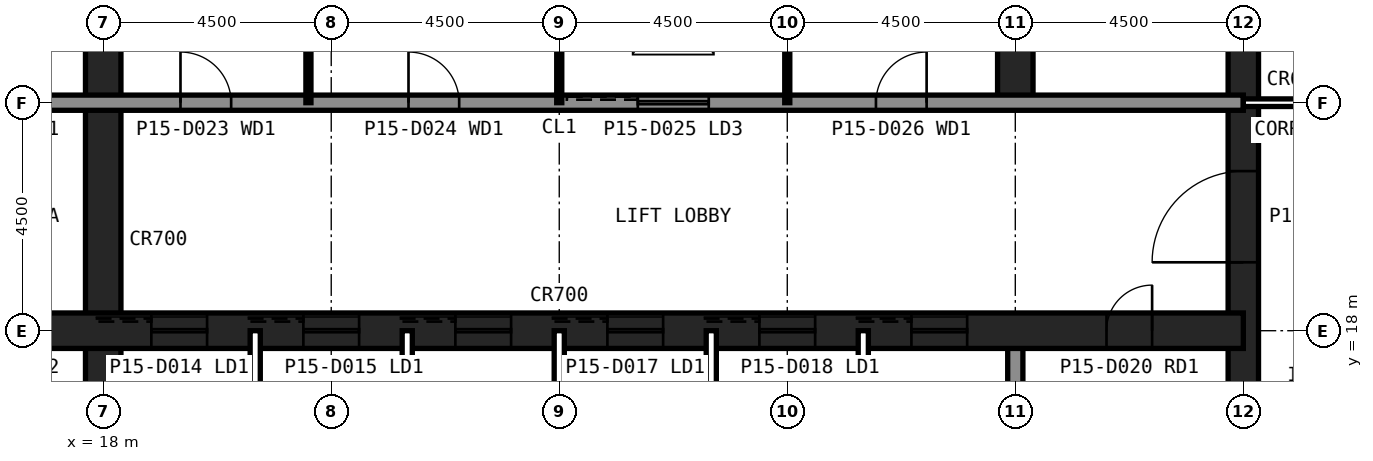
"""IFC4 building model, lengths in metres.
Left out: names, types, materials, properties, quantities, classifications, styles, units other than length and angle.
Written with IfcOpenShell. Run it as: python <this file> out.ifc"""

import sys

from ifc_helpers import new_model, si_unit, direction, frame, frame_2d, origin, place, context, subcontext, project, spatial, rectangle, extrude, element, fill, save


model = new_model("IFC4")
c1 = context("Model", 3, precision=1e-05, world=origin(), true_north=direction((0.0, 1.0)))
c2 = subcontext(c1, "Body", "Model", "MODEL_VIEW")
j1 = project(units=[si_unit("LENGTHUNIT", "METRE"), si_unit("PLANEANGLEUNIT", "RADIAN")], contexts=[c1])
p1 = place(None, origin())
s1 = spatial("IfcSite", under=j1, at=p1, CompositionType="ELEMENT")
p2 = place(p1, origin())
s2 = spatial("IfcBuilding", under=s1, at=p2, CompositionType="ELEMENT")
p3 = place(p2, frame((0.0, 0.0, 62.6)))
s3 = spatial("IfcBuildingStorey", under=s2, at=p3, CompositionType="ELEMENT", Elevation=62.6)
p4 = place(p3, frame((40.5, 13.5, 0.0), z_axis=(0.0, 0.0, 1.0), x_axis=(0.0, 1.0, 0.0)))
e1 = element("IfcWall", 1, at=p4, inside=s3, PredefinedType="SHEAR", context=c2, shape_type="SweptSolid", body=[
    extrude(rectangle(XDim=27.0, YDim=0.6, at=frame_2d((13.5, 0.0))), origin(), (0.0, 0.0, 1.0), 4.2),
])
p5 = place(p4, frame((5.85, 0.0, 0.0)))
e2 = element("IfcOpeningElement", 2, at=p5, cuts=e1, PredefinedType="OPENING", context=c2, shape_type="SweptSolid", body=[
    extrude(rectangle(XDim=1.8, YDim=2.1, at=frame_2d((0.9, 1.05))), frame((0.0, 0.31, 0.0), z_axis=(0.0, -1.0, 0.0), x_axis=(1.0, 0.0, 0.0)), (0.0, 0.0, 1.0), 0.62),
])
p6 = place(p4, frame((19.65, 0.0, 0.0)))
e3 = element("IfcOpeningElement", 3, at=p6, cuts=e1, PredefinedType="OPENING", context=c2, shape_type="SweptSolid", body=[
    extrude(rectangle(XDim=1.2, YDim=2.1, at=frame_2d((0.6, 1.05))), frame((0.0, 0.31, 0.0), z_axis=(0.0, -1.0, 0.0), x_axis=(1.0, 0.0, 0.0)), (0.0, 0.0, 1.0), 0.62),
])
p7 = place(p3, frame((18.0, 13.5, 0.0), z_axis=(0.0, 0.0, 1.0), x_axis=(0.0, 1.0, 0.0)))
e4 = element("IfcWall", 4, at=p7, inside=s3, PredefinedType="SHEAR", context=c2, shape_type="SweptSolid", body=[
    extrude(rectangle(XDim=18.0, YDim=0.7, at=frame_2d((9.0, 0.0))), origin(), (0.0, 0.0, 1.0), 4.2),
])
p8 = place(p3, frame((36.0, 13.5, 0.0), z_axis=(0.0, 0.0, 1.0), x_axis=(0.0, 1.0, 0.0)))
e5 = element("IfcWall", 5, at=p8, inside=s3, PredefinedType="SOLIDWALL", context=c2, shape_type="SweptSolid", body=[
    extrude(rectangle(XDim=4.5, YDim=0.3, at=frame_2d((2.25, 0.0))), origin(), (0.0, 0.0, 1.0), 4.04),
])
p9 = place(p3, frame((36.0, 22.5, 0.0), z_axis=(0.0, 0.0, 1.0), x_axis=(0.0, 1.0, 0.0)))
e6 = element("IfcWall", 6, at=p9, inside=s3, PredefinedType="SHEAR", context=c2, shape_type="SweptSolid", body=[
    extrude(rectangle(XDim=18.0, YDim=0.7, at=frame_2d((9.0, 0.0))), origin(), (0.0, 0.0, 1.0), 4.2),
])
p10 = place(p3, frame((13.5, 18.0, 0.0), z_axis=(0.0, 0.0, 1.0), x_axis=(1.0, 0.0, 0.0)))
e7 = element("IfcWall", 7, at=p10, inside=s3, PredefinedType="SHEAR", context=c2, shape_type="SweptSolid", body=[
    extrude(rectangle(XDim=27.0, YDim=0.7, at=frame_2d((13.5, 0.0))), origin(), (0.0, 0.0, 1.0), 4.2),
])
p11 = place(p10, frame((24.3, 0.0, 0.0)))
e8 = element("IfcOpeningElement", 8, at=p11, cuts=e7, PredefinedType="OPENING", context=c2, shape_type="SweptSolid", body=[
    extrude(rectangle(XDim=0.9, YDim=2.1, at=frame_2d((0.45, 1.05))), frame((0.0, 0.36, 0.0), z_axis=(0.0, -1.0, 0.0), x_axis=(1.0, 0.0, 0.0)), (0.0, 0.0, 1.0), 0.72),
])
p12 = place(p10, frame((5.45, 0.0, 0.0)))
e9 = element("IfcOpeningElement", 9, at=p12, cuts=e7, PredefinedType="OPENING", context=c2, shape_type="SweptSolid", body=[
    extrude(rectangle(XDim=1.1, YDim=2.1, at=frame_2d((0.55, 1.05))), frame((0.0, 0.36, 0.0), z_axis=(0.0, -1.0, 0.0), x_axis=(1.0, 0.0, 0.0)), (0.0, 0.0, 1.0), 0.72),
])
p13 = place(p10, frame((8.45, 0.0, 0.0)))
e10 = element("IfcOpeningElement", 10, at=p13, cuts=e7, PredefinedType="OPENING", context=c2, shape_type="SweptSolid", body=[
    extrude(rectangle(XDim=1.1, YDim=2.1, at=frame_2d((0.55, 1.05))), frame((0.0, 0.36, 0.0), z_axis=(0.0, -1.0, 0.0), x_axis=(1.0, 0.0, 0.0)), (0.0, 0.0, 1.0), 0.72),
])
p14 = place(p10, frame((11.45, 0.0, 0.0)))
e11 = element("IfcOpeningElement", 11, at=p14, cuts=e7, PredefinedType="OPENING", context=c2, shape_type="SweptSolid", body=[
    extrude(rectangle(XDim=1.1, YDim=2.1, at=frame_2d((0.55, 1.05))), frame((0.0, 0.36, 0.0), z_axis=(0.0, -1.0, 0.0), x_axis=(1.0, 0.0, 0.0)), (0.0, 0.0, 1.0), 0.72),
])
p15 = place(p10, frame((14.45, 0.0, 0.0)))
e12 = element("IfcOpeningElement", 12, at=p15, cuts=e7, PredefinedType="OPENING", context=c2, shape_type="SweptSolid", body=[
    extrude(rectangle(XDim=1.1, YDim=2.1, at=frame_2d((0.55, 1.05))), frame((0.0, 0.36, 0.0), z_axis=(0.0, -1.0, 0.0), x_axis=(1.0, 0.0, 0.0)), (0.0, 0.0, 1.0), 0.72),
])
p16 = place(p10, frame((17.45, 0.0, 0.0)))
e13 = element("IfcOpeningElement", 13, at=p16, cuts=e7, PredefinedType="OPENING", context=c2, shape_type="SweptSolid", body=[
    extrude(rectangle(XDim=1.1, YDim=2.1, at=frame_2d((0.55, 1.05))), frame((0.0, 0.36, 0.0), z_axis=(0.0, -1.0, 0.0), x_axis=(1.0, 0.0, 0.0)), (0.0, 0.0, 1.0), 0.72),
])
p17 = place(p10, frame((20.45, 0.0, 0.0)))
e14 = element("IfcOpeningElement", 14, at=p17, cuts=e7, PredefinedType="OPENING", context=c2, shape_type="SweptSolid", body=[
    extrude(rectangle(XDim=1.1, YDim=2.1, at=frame_2d((0.55, 1.05))), frame((0.0, 0.36, 0.0), z_axis=(0.0, -1.0, 0.0), x_axis=(1.0, 0.0, 0.0)), (0.0, 0.0, 1.0), 0.72),
])
p18 = place(p10, frame((1.6, 0.0, 0.0)))
e15 = element("IfcOpeningElement", 15, at=p18, cuts=e7, PredefinedType="OPENING", context=c2, shape_type="SweptSolid", body=[
    extrude(rectangle(XDim=1.3, YDim=2.2, at=frame_2d((0.65, 1.1))), frame((0.0, 0.36, 0.0), z_axis=(0.0, -1.0, 0.0), x_axis=(1.0, 0.0, 0.0)), (0.0, 0.0, 1.0), 0.72),
])
p19 = place(p3, frame((13.5, 22.5, 0.0), z_axis=(0.0, 0.0, 1.0), x_axis=(1.0, 0.0, 0.0)))
e16 = element("IfcWall", 16, at=p19, inside=s3, PredefinedType="SOLIDWALL", context=c2, shape_type="SweptSolid", body=[
    extrude(rectangle(XDim=27.0, YDim=0.3, at=frame_2d((13.5, 0.0))), origin(), (0.0, 0.0, 1.0), 4.04),
])
p20 = place(p19, frame((1.65, 0.0, 0.0)))
e17 = element("IfcOpeningElement", 17, at=p20, cuts=e16, PredefinedType="OPENING", context=c2, shape_type="SweptSolid", body=[
    extrude(rectangle(XDim=1.2, YDim=2.1, at=frame_2d((0.6, 1.05))), frame((0.0, 0.16, 0.0), z_axis=(0.0, -1.0, 0.0), x_axis=(1.0, 0.0, 0.0)), (0.0, 0.0, 1.0), 0.32),
])
p21 = place(p19, frame((6.025, 0.0, 0.0)))
e18 = element("IfcOpeningElement", 18, at=p21, cuts=e16, PredefinedType="OPENING", context=c2, shape_type="SweptSolid", body=[
    extrude(rectangle(XDim=1.0, YDim=2.1, at=frame_2d((0.5, 1.05))), frame((0.0, 0.16, 0.0), z_axis=(0.0, -1.0, 0.0), x_axis=(1.0, 0.0, 0.0)), (0.0, 0.0, 1.0), 0.32),
])
p22 = place(p19, frame((10.525, 0.0, 0.0)))
e19 = element("IfcOpeningElement", 19, at=p22, cuts=e16, PredefinedType="OPENING", context=c2, shape_type="SweptSolid", body=[
    extrude(rectangle(XDim=1.0, YDim=2.1, at=frame_2d((0.5, 1.05))), frame((0.0, 0.16, 0.0), z_axis=(0.0, -1.0, 0.0), x_axis=(1.0, 0.0, 0.0)), (0.0, 0.0, 1.0), 0.32),
])
p23 = place(p19, frame((19.75, 0.0, 0.0)))
e20 = element("IfcOpeningElement", 20, at=p23, cuts=e16, PredefinedType="OPENING", context=c2, shape_type="SweptSolid", body=[
    extrude(rectangle(XDim=1.0, YDim=2.1, at=frame_2d((0.5, 1.05))), frame((0.0, 0.16, 0.0), z_axis=(0.0, -1.0, 0.0), x_axis=(1.0, 0.0, 0.0)), (0.0, 0.0, 1.0), 0.32),
])
p24 = place(p19, frame((15.05, 0.0, 0.0)))
e21 = element("IfcOpeningElement", 21, at=p24, cuts=e16, PredefinedType="OPENING", context=c2, shape_type="SweptSolid", body=[
    extrude(rectangle(XDim=1.4, YDim=2.4, at=frame_2d((0.7, 1.2))), frame((0.0, 0.16, 0.0), z_axis=(0.0, -1.0, 0.0), x_axis=(1.0, 0.0, 0.0)), (0.0, 0.0, 1.0), 0.32),
])
for number, where, z_axis, x_axis in (
    (22, (21.0, 13.5, 0.0), (0.0, 0.0, 1.0), (0.0, 1.0, 0.0)),
    (23, (24.0, 13.5, 0.0), (0.0, 0.0, 1.0), (0.0, 1.0, 0.0)),
    (24, (27.0, 13.5, 0.0), (0.0, 0.0, 1.0), (0.0, 1.0, 0.0)),
    (25, (30.0, 13.5, 0.0), (0.0, 0.0, 1.0), (0.0, 1.0, 0.0)),
    (26, (33.0, 13.5, 0.0), (0.0, 0.0, 1.0), (0.0, 1.0, 0.0)),
):
    element("IfcWall", number, at=place(p3, frame(where, z_axis=z_axis, x_axis=x_axis)), inside=s3, PredefinedType="PARTITIONING", context=c2, shape_type="SweptSolid", body=[
        extrude(rectangle(XDim=4.5, YDim=0.2, at=frame_2d((2.25, 0.0))), origin(), (0.0, 0.0, 1.0), 4.04),
    ])
for number, where, z_axis, x_axis in (
    (27, (22.05, 22.5, 0.0), (0.0, 0.0, 1.0), (0.0, 1.0, 0.0)),
    (28, (27.0, 22.5, 0.0), (0.0, 0.0, 1.0), (0.0, 1.0, 0.0)),
    (29, (31.5, 22.5, 0.0), (0.0, 0.0, 1.0), (0.0, 1.0, 0.0)),
):
    element("IfcWall", number, at=place(p3, frame(where, z_axis=z_axis, x_axis=x_axis)), inside=s3, PredefinedType="PLUMBINGWALL", context=c2, shape_type="SweptSolid", body=[
        extrude(rectangle(XDim=9.0, YDim=0.1, at=frame_2d((4.5, 0.0))), origin(), (0.0, 0.0, 1.0), 4.04),
    ])
p25 = place(p3, frame((40.5, 22.5, 0.0), z_axis=(0.0, 0.0, 1.0), x_axis=(1.0, 0.0, 0.0)))
e30 = element("IfcWall", 30, at=p25, inside=s3, PredefinedType="PARTITIONING", context=c2, shape_type="SweptSolid", body=[
    extrude(rectangle(XDim=3.0, YDim=0.15, at=frame_2d((1.5, 0.0))), origin(), (0.0, 0.0, 1.0), 3.189),
])
p26 = place(p5, origin())
e31 = element("IfcDoor", 31, at=p26, inside=s3, OperationType="SINGLE_SWING_LEFT", PredefinedType="DOOR", context=c2, shape_type="SweptSolid", body=[
    extrude(rectangle(XDim=1.8, YDim=2.1, at=frame_2d((0.9, 1.05))), frame((0.0, 0.025, 0.0), z_axis=(0.0, -1.0, 0.0), x_axis=(1.0, 0.0, 0.0)), (0.0, 0.0, 1.0), 0.05),
])
fill(e2, e31)
p27 = place(p21, origin())
e32 = element("IfcDoor", 32, at=p27, inside=s3, OperationType="SINGLE_SWING_LEFT", PredefinedType="DOOR", context=c2, shape_type="SweptSolid", body=[
    extrude(rectangle(XDim=1.0, YDim=2.1, at=frame_2d((0.5, 1.05))), frame((0.0, 0.025, 0.0), z_axis=(0.0, -1.0, 0.0), x_axis=(1.0, 0.0, 0.0)), (0.0, 0.0, 1.0), 0.05),
])
fill(e18, e32)
p28 = place(p22, origin())
e33 = element("IfcDoor", 33, at=p28, inside=s3, OperationType="SINGLE_SWING_LEFT", PredefinedType="DOOR", context=c2, shape_type="SweptSolid", body=[
    extrude(rectangle(XDim=1.0, YDim=2.1, at=frame_2d((0.5, 1.05))), frame((0.0, 0.025, 0.0), z_axis=(0.0, -1.0, 0.0), x_axis=(1.0, 0.0, 0.0)), (0.0, 0.0, 1.0), 0.05),
])
fill(e19, e33)
p29 = place(p23, origin())
e34 = element("IfcDoor", 34, at=p29, inside=s3, OperationType="SINGLE_SWING_RIGHT", PredefinedType="DOOR", context=c2, shape_type="SweptSolid", body=[
    extrude(rectangle(XDim=1.0, YDim=2.1, at=frame_2d((0.5, 1.05))), frame((0.0, 0.025, 0.0), z_axis=(0.0, -1.0, 0.0), x_axis=(1.0, 0.0, 0.0)), (0.0, 0.0, 1.0), 0.05),
])
fill(e20, e34)
p30 = place(p11, origin())
e35 = element("IfcDoor", 35, at=p30, inside=s3, OperationType="SINGLE_SWING_RIGHT", PredefinedType="DOOR", context=c2, shape_type="SweptSolid", body=[
    extrude(rectangle(XDim=0.9, YDim=2.1, at=frame_2d((0.45, 1.05))), frame((0.0, 0.025, 0.0), z_axis=(0.0, -1.0, 0.0), x_axis=(1.0, 0.0, 0.0)), (0.0, 0.0, 1.0), 0.05),
])
fill(e8, e35)
p31 = place(p12, origin())
e36 = element("IfcDoor", 36, at=p31, inside=s3, OperationType="SLIDING_TO_LEFT", PredefinedType="DOOR", context=c2, shape_type="SweptSolid", body=[
    extrude(rectangle(XDim=1.1, YDim=2.1, at=frame_2d((0.55, 1.05))), frame((0.0, 0.025, 0.0), z_axis=(0.0, -1.0, 0.0), x_axis=(1.0, 0.0, 0.0)), (0.0, 0.0, 1.0), 0.05),
])
fill(e9, e36)
p32 = place(p13, origin())
e37 = element("IfcDoor", 37, at=p32, inside=s3, OperationType="SLIDING_TO_LEFT", PredefinedType="DOOR", context=c2, shape_type="SweptSolid", body=[
    extrude(rectangle(XDim=1.1, YDim=2.1, at=frame_2d((0.55, 1.05))), frame((0.0, 0.025, 0.0), z_axis=(0.0, -1.0, 0.0), x_axis=(1.0, 0.0, 0.0)), (0.0, 0.0, 1.0), 0.05),
])
fill(e10, e37)
p33 = place(p14, origin())
e38 = element("IfcDoor", 38, at=p33, inside=s3, OperationType="SLIDING_TO_LEFT", PredefinedType="DOOR", context=c2, shape_type="SweptSolid", body=[
    extrude(rectangle(XDim=1.1, YDim=2.1, at=frame_2d((0.55, 1.05))), frame((0.0, 0.025, 0.0), z_axis=(0.0, -1.0, 0.0), x_axis=(1.0, 0.0, 0.0)), (0.0, 0.0, 1.0), 0.05),
])
fill(e11, e38)
p34 = place(p15, origin())
e39 = element("IfcDoor", 39, at=p34, inside=s3, OperationType="SLIDING_TO_LEFT", PredefinedType="DOOR", context=c2, shape_type="SweptSolid", body=[
    extrude(rectangle(XDim=1.1, YDim=2.1, at=frame_2d((0.55, 1.05))), frame((0.0, 0.025, 0.0), z_axis=(0.0, -1.0, 0.0), x_axis=(1.0, 0.0, 0.0)), (0.0, 0.0, 1.0), 0.05),
])
fill(e12, e39)
p35 = place(p16, origin())
e40 = element("IfcDoor", 40, at=p35, inside=s3, OperationType="SLIDING_TO_LEFT", PredefinedType="DOOR", context=c2, shape_type="SweptSolid", body=[
    extrude(rectangle(XDim=1.1, YDim=2.1, at=frame_2d((0.55, 1.05))), frame((0.0, 0.025, 0.0), z_axis=(0.0, -1.0, 0.0), x_axis=(1.0, 0.0, 0.0)), (0.0, 0.0, 1.0), 0.05),
])
fill(e13, e40)
p36 = place(p17, origin())
e41 = element("IfcDoor", 41, at=p36, inside=s3, OperationType="SLIDING_TO_LEFT", PredefinedType="DOOR", context=c2, shape_type="SweptSolid", body=[
    extrude(rectangle(XDim=1.1, YDim=2.1, at=frame_2d((0.55, 1.05))), frame((0.0, 0.025, 0.0), z_axis=(0.0, -1.0, 0.0), x_axis=(1.0, 0.0, 0.0)), (0.0, 0.0, 1.0), 0.05),
])
fill(e14, e41)
p37 = place(p24, origin())
e42 = element("IfcDoor", 42, at=p37, inside=s3, OperationType="SLIDING_TO_LEFT", PredefinedType="DOOR", context=c2, shape_type="SweptSolid", body=[
    extrude(rectangle(XDim=1.4, YDim=2.4, at=frame_2d((0.7, 1.2))), frame((0.0, 0.025, 0.0), z_axis=(0.0, -1.0, 0.0), x_axis=(1.0, 0.0, 0.0)), (0.0, 0.0, 1.0), 0.05),
])
fill(e21, e42)
save(model, sys.argv[1])
